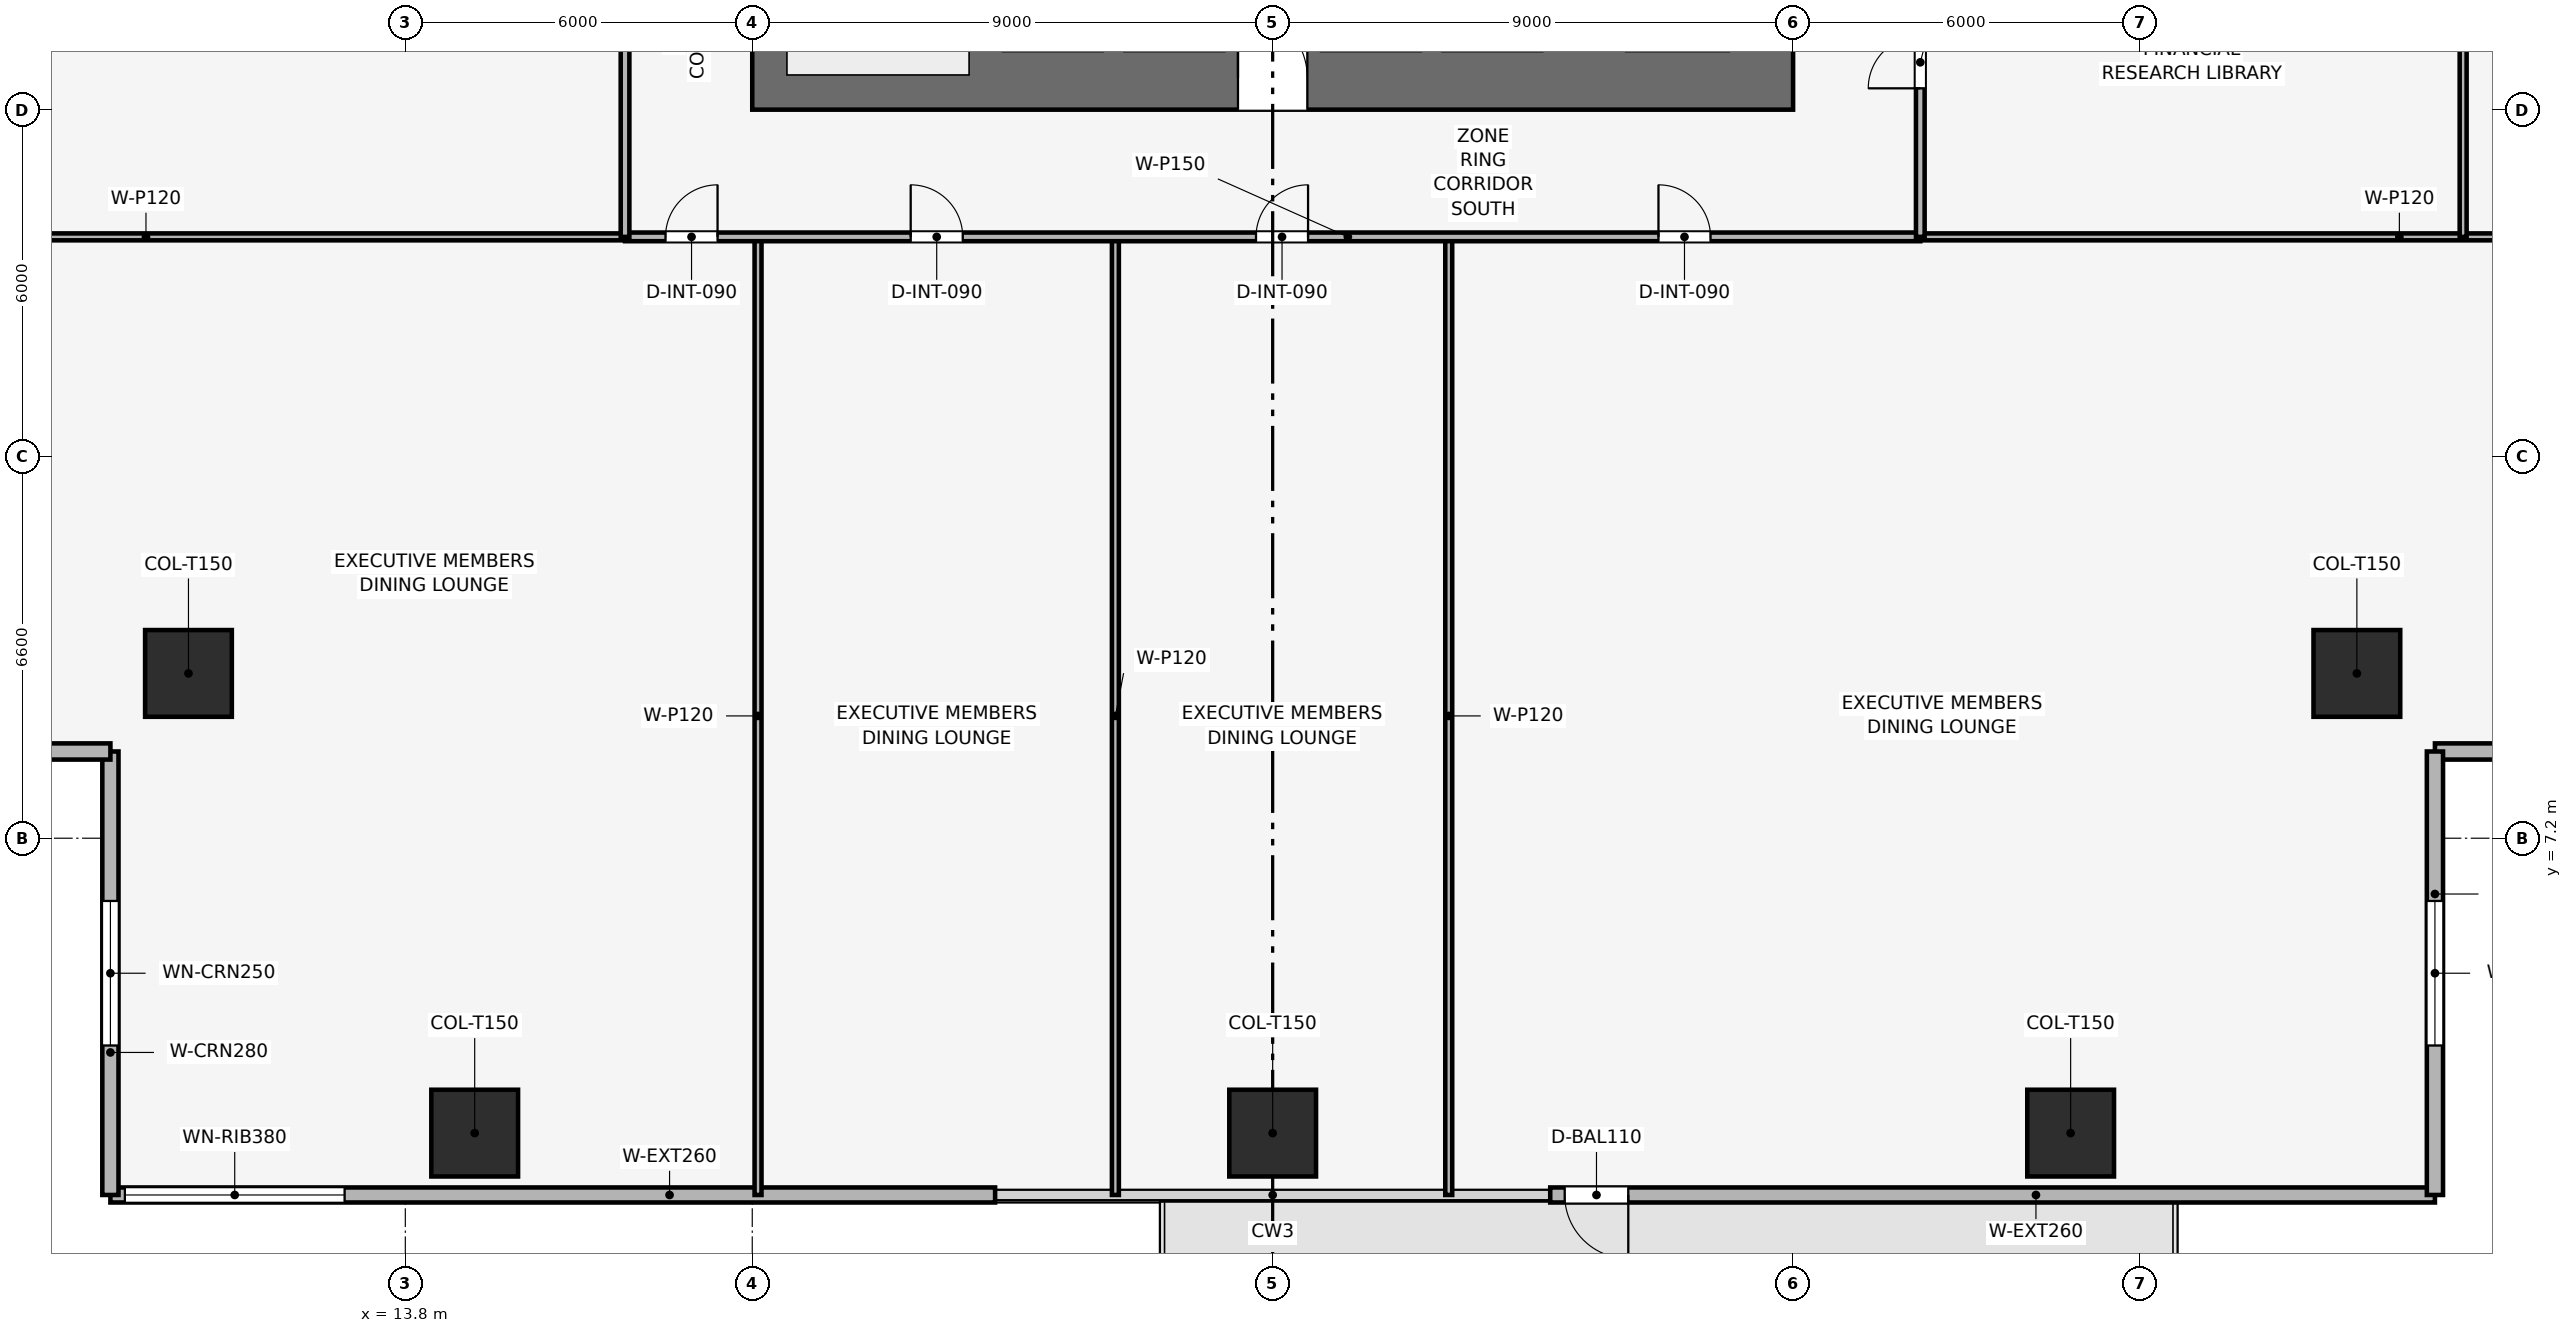
"""IFC4 building model, lengths in metres.
Left out: names, types, materials, properties, quantities, classifications, styles, units other than length and angle.
Written with IfcOpenShell. Run it as: python <this file> out.ifc"""

import sys

from ifc_helpers import new_model, si_unit, direction, frame, frame_2d, origin, origin_2d, place, context, subcontext, project, spatial, rectangle, extrude, element, fill, save


model = new_model("IFC4")
c1 = context("Model", 3, precision=1e-05, world=origin(), true_north=direction((0.0, 1.0)))
c2 = subcontext(c1, "Body", "Model", "MODEL_VIEW")
j1 = project(units=[si_unit("LENGTHUNIT", "METRE"), si_unit("PLANEANGLEUNIT", "RADIAN")], contexts=[c1])
p1 = place(None, origin())
s1 = spatial("IfcSite", under=j1, at=p1, CompositionType="ELEMENT")
p2 = place(p1, origin())
s2 = spatial("IfcBuilding", under=s1, at=p2, CompositionType="ELEMENT")
p3 = place(p2, frame((0.0, 0.0, 69.0)))
s3 = spatial("IfcBuildingStorey", under=s2, at=p3, CompositionType="ELEMENT", Elevation=69.0)
p4 = place(p3, frame((19.8, 20.35, 0.0), z_axis=(0.0, 0.0, 1.0), x_axis=(1.0, 0.0, 0.0)))
e1 = element("IfcWall", 1, at=p4, inside=s3, PredefinedType="SHEAR", context=c2, shape_type="SweptSolid", body=[
    extrude(rectangle(XDim=18.0, YDim=1.1, at=frame_2d((9.0, 0.0))), origin(), (0.0, 0.0, 1.0), 3.9),
])
p5 = place(p4, frame((8.4, 0.0, 0.0)))
e2 = element("IfcOpeningElement", 2, at=p5, cuts=e1, PredefinedType="OPENING", context=c2, shape_type="SweptSolid", body=[
    extrude(rectangle(XDim=1.2, YDim=2.2, at=frame_2d((0.6, 1.1))), frame((0.0, 0.56, 0.0), z_axis=(0.0, -1.0, 0.0), x_axis=(1.0, 0.0, 0.0)), (0.0, 0.0, 1.0), 1.12),
])
for number, where, z_axis, x_axis in (
    (3, (15.0, 2.1, 0.003), (0.0, 0.0, 1.0), (1.0, 0.0, 0.0)),
    (4, (28.8, 2.1, 0.003), (0.0, 0.0, 1.0), (1.0, 0.0, 0.0)),
    (5, (42.6, 2.1, 0.003), (0.0, 0.0, 1.0), (1.0, 0.0, 0.0)),
    (6, (10.05, 10.05, 0.003), (0.0, 0.0, 1.0), (1.0, 0.0, 0.0)),
    (7, (47.55, 10.05, 0.003), (0.0, 0.0, 1.0), (1.0, 0.0, 0.0)),
):
    element("IfcColumn", number, at=place(p3, frame(where, z_axis=z_axis, x_axis=x_axis)), inside=s3, PredefinedType="COLUMN", context=c2, shape_type="SweptSolid", body=[
        extrude(rectangle(XDim=1.5, YDim=1.5, at=origin_2d()), origin(), (0.0, 0.0, 1.0), 3.644),
    ])
p6 = place(p3, frame((48.9, 1.03, 0.0), z_axis=(0.0, 0.0, 1.0), x_axis=(-1.0, 0.0, 0.0)))
e8 = element("IfcWall", 8, at=p6, inside=s3, PredefinedType="SOLIDWALL", context=c2, shape_type="SweptSolid", body=[
    extrude(rectangle(XDim=15.3, YDim=0.26, at=frame_2d((7.65, 0.0))), origin(), (0.0, 0.0, 1.0), 3.65),
])
p7 = place(p6, frame((13.95, 0.0, 0.0)))
e9 = element("IfcOpeningElement", 9, at=p7, cuts=e8, PredefinedType="OPENING", context=c2, shape_type="SweptSolid", body=[
    extrude(rectangle(XDim=1.1, YDim=2.2, at=frame_2d((0.55, 1.1))), frame((0.0, 0.14, 0.0), z_axis=(0.0, -1.0, 0.0), x_axis=(1.0, 0.0, 0.0)), (0.0, 0.0, 1.0), 0.28),
])
p8 = place(p3, frame((24.0, 1.03, 0.0), z_axis=(0.0, 0.0, 1.0), x_axis=(-1.0, 0.0, 0.0)))
e10 = element("IfcWall", 10, at=p8, inside=s3, PredefinedType="SOLIDWALL", context=c2, shape_type="SweptSolid", body=[
    extrude(rectangle(XDim=15.3, YDim=0.26, at=frame_2d((7.65, 0.0))), origin(), (0.0, 0.0, 1.0), 3.65),
])
p9 = place(p8, frame((11.25, 0.0, 0.9)))
e11 = element("IfcOpeningElement", 11, at=p9, cuts=e10, PredefinedType="OPENING", context=c2, shape_type="SweptSolid", body=[
    extrude(rectangle(XDim=3.8, YDim=1.9, at=frame_2d((1.9, 0.95))), frame((0.0, 0.14, 0.0), z_axis=(0.0, -1.0, 0.0), x_axis=(1.0, 0.0, 0.0)), (0.0, 0.0, 1.0), 0.28),
])
p10 = place(p3, frame((8.7, 1.03, 0.0), z_axis=(0.0, 0.0, 1.0), x_axis=(0.0, 1.0, 0.0)))
e12 = element("IfcWall", 12, at=p10, inside=s3, PredefinedType="SOLIDWALL", context=c2, shape_type="SweptSolid", body=[
    extrude(rectangle(XDim=7.67, YDim=0.28, at=frame_2d((3.835, 0.0))), origin(), (0.0, 0.0, 1.0), 3.65),
])
p11 = place(p10, frame((2.585, 0.0, 0.9)))
e13 = element("IfcOpeningElement", 13, at=p11, cuts=e12, PredefinedType="OPENING", context=c2, shape_type="SweptSolid", body=[
    extrude(rectangle(XDim=2.5, YDim=1.9, at=frame_2d((1.25, 0.95))), frame((0.0, 0.15, 0.0), z_axis=(0.0, -1.0, 0.0), x_axis=(1.0, 0.0, 0.0)), (0.0, 0.0, 1.0), 0.3),
])
p12 = place(p3, frame((8.7, 8.7, 0.0), z_axis=(0.0, 0.0, 1.0), x_axis=(-1.0, 0.0, 0.0)))
e14 = element("IfcWall", 14, at=p12, inside=s3, PredefinedType="SOLIDWALL", context=c2, shape_type="SweptSolid", body=[
    extrude(rectangle(XDim=7.67, YDim=0.28, at=frame_2d((3.835, 0.0))), origin(), (0.0, 0.0, 1.0), 3.65),
])
p13 = place(p12, frame((2.585, 0.0, 0.9)))
e15 = element("IfcOpeningElement", 15, at=p13, cuts=e14, PredefinedType="OPENING", context=c2, shape_type="SweptSolid", body=[
    extrude(rectangle(XDim=2.5, YDim=1.9, at=frame_2d((1.25, 0.95))), frame((0.0, 0.15, 0.0), z_axis=(0.0, -1.0, 0.0), x_axis=(1.0, 0.0, 0.0)), (0.0, 0.0, 1.0), 0.3),
])
p14 = place(p3, frame((56.57, 8.7, 0.0), z_axis=(0.0, 0.0, 1.0), x_axis=(-1.0, 0.0, 0.0)))
e16 = element("IfcWall", 16, at=p14, inside=s3, PredefinedType="SOLIDWALL", context=c2, shape_type="SweptSolid", body=[
    extrude(rectangle(XDim=7.67, YDim=0.28, at=frame_2d((3.835, 0.0))), origin(), (0.0, 0.0, 1.0), 3.65),
])
p15 = place(p14, frame((2.585, 0.0, 0.9)))
e17 = element("IfcOpeningElement", 17, at=p15, cuts=e16, PredefinedType="OPENING", context=c2, shape_type="SweptSolid", body=[
    extrude(rectangle(XDim=2.5, YDim=1.9, at=frame_2d((1.25, 0.95))), frame((0.0, 0.15, 0.0), z_axis=(0.0, -1.0, 0.0), x_axis=(1.0, 0.0, 0.0)), (0.0, 0.0, 1.0), 0.3),
])
p16 = place(p3, frame((48.9, 8.7, 0.0), z_axis=(0.0, 0.0, 1.0), x_axis=(0.0, -1.0, 0.0)))
e18 = element("IfcWall", 18, at=p16, inside=s3, PredefinedType="SOLIDWALL", context=c2, shape_type="SweptSolid", body=[
    extrude(rectangle(XDim=7.67, YDim=0.28, at=frame_2d((3.835, 0.0))), origin(), (0.0, 0.0, 1.0), 3.65),
])
p17 = place(p16, frame((2.585, 0.0, 0.9)))
e19 = element("IfcOpeningElement", 19, at=p17, cuts=e18, PredefinedType="OPENING", context=c2, shape_type="SweptSolid", body=[
    extrude(rectangle(XDim=2.5, YDim=1.9, at=frame_2d((1.25, 0.95))), frame((0.0, 0.15, 0.0), z_axis=(0.0, -1.0, 0.0), x_axis=(1.0, 0.0, 0.0)), (0.0, 0.0, 1.0), 0.3),
])
for number, where, z_axis, x_axis in (
    (20, (19.9, 1.03, 0.0), (0.0, 0.0, 1.0), (0.0, 1.0, 0.0)),
    (21, (26.08, 1.03, 0.0), (0.0, 0.0, 1.0), (0.0, 1.0, 0.0)),
    (22, (31.845, 1.03, 0.0), (0.0, 0.0, 1.0), (0.0, 1.0, 0.0)),
    (23, (1.03, 17.6, 0.0), (0.0, 0.0, 1.0), (1.0, 0.0, 0.0)),
    (24, (40.0, 17.6, 0.0), (0.0, 0.0, 1.0), (1.0, 0.0, 0.0)),
):
    element("IfcWall", number, at=place(p3, frame(where, z_axis=z_axis, x_axis=x_axis)), inside=s3, PredefinedType="PARTITIONING", context=c2, shape_type="SweptSolid", body=[
        extrude(rectangle(XDim=16.57, YDim=0.12, at=frame_2d((8.285, 0.0))), origin(), (0.0, 0.0, 1.0), 2.935),
    ])
p18 = place(p3, frame((49.388, 17.6, 0.0), z_axis=(0.0, 0.0, 1.0), x_axis=(0.0, 1.0, 0.0)))
e25 = element("IfcWall", 25, at=p18, inside=s3, PredefinedType="PARTITIONING", context=c2, shape_type="SweptSolid", body=[
    extrude(rectangle(XDim=6.038, YDim=0.12, at=frame_2d((3.019, 0.0))), origin(), (0.0, 0.0, 1.0), 3.085),
])
p19 = place(p18, frame((3.753, 0.0, 0.0)))
e26 = element("IfcOpeningElement", 26, at=p19, cuts=e25, PredefinedType="OPENING", context=c2, shape_type="SweptSolid", body=[
    extrude(rectangle(XDim=0.9, YDim=2.1, at=frame_2d((0.45, 1.05))), frame((0.0, 0.07, 0.0), z_axis=(0.0, -1.0, 0.0), x_axis=(1.0, 0.0, 0.0)), (0.0, 0.0, 1.0), 0.14),
])
p20 = place(p3, frame((17.6, 17.6, 0.0), z_axis=(0.0, 0.0, 1.0), x_axis=(1.0, 0.0, 0.0)))
e27 = element("IfcWall", 27, at=p20, inside=s3, PredefinedType="PARTITIONING", context=c2, shape_type="SweptSolid", body=[
    extrude(rectangle(XDim=22.4, YDim=0.15, at=frame_2d((11.2, 0.0))), origin(), (0.0, 0.0, 1.0), 3.085),
])
p21 = place(p20, frame((0.7, 0.0, 0.0)))
e28 = element("IfcOpeningElement", 28, at=p21, cuts=e27, PredefinedType="OPENING", context=c2, shape_type="SweptSolid", body=[
    extrude(rectangle(XDim=0.9, YDim=2.1, at=frame_2d((0.45, 1.05))), frame((0.0, 0.085, 0.0), z_axis=(0.0, -1.0, 0.0), x_axis=(1.0, 0.0, 0.0)), (0.0, 0.0, 1.0), 0.17),
])
p22 = place(p20, frame((4.94, 0.0, 0.0)))
e29 = element("IfcOpeningElement", 29, at=p22, cuts=e27, PredefinedType="OPENING", context=c2, shape_type="SweptSolid", body=[
    extrude(rectangle(XDim=0.9, YDim=2.1, at=frame_2d((0.45, 1.05))), frame((0.0, 0.085, 0.0), z_axis=(0.0, -1.0, 0.0), x_axis=(1.0, 0.0, 0.0)), (0.0, 0.0, 1.0), 0.17),
])
p23 = place(p20, frame((10.912, 0.0, 0.0)))
e30 = element("IfcOpeningElement", 30, at=p23, cuts=e27, PredefinedType="OPENING", context=c2, shape_type="SweptSolid", body=[
    extrude(rectangle(XDim=0.9, YDim=2.1, at=frame_2d((0.45, 1.05))), frame((0.0, 0.085, 0.0), z_axis=(0.0, -1.0, 0.0), x_axis=(1.0, 0.0, 0.0)), (0.0, 0.0, 1.0), 0.17),
])
p24 = place(p20, frame((17.872, 0.0, 0.0)))
e31 = element("IfcOpeningElement", 31, at=p24, cuts=e27, PredefinedType="OPENING", context=c2, shape_type="SweptSolid", body=[
    extrude(rectangle(XDim=0.9, YDim=2.1, at=frame_2d((0.45, 1.05))), frame((0.0, 0.085, 0.0), z_axis=(0.0, -1.0, 0.0), x_axis=(1.0, 0.0, 0.0)), (0.0, 0.0, 1.0), 0.17),
])
p25 = place(p3, frame((17.6, 17.6, 0.0), z_axis=(0.0, 0.0, 1.0), x_axis=(0.0, 1.0, 0.0)))
e32 = element("IfcWall", 32, at=p25, inside=s3, PredefinedType="PARTITIONING", context=c2, shape_type="SweptSolid", body=[
    extrude(rectangle(XDim=22.4, YDim=0.15, at=frame_2d((11.2, 0.0))), origin(), (0.0, 0.0, 1.0), 3.085),
])
p26 = place(p25, frame((10.75, 0.0, 0.0)))
e33 = element("IfcOpeningElement", 33, at=p26, cuts=e32, PredefinedType="OPENING", context=c2, shape_type="SweptSolid", body=[
    extrude(rectangle(XDim=0.9, YDim=2.1, at=frame_2d((0.45, 1.05))), frame((0.0, 0.085, 0.0), z_axis=(0.0, -1.0, 0.0), x_axis=(1.0, 0.0, 0.0)), (0.0, 0.0, 1.0), 0.17),
])
p27 = place(p3, frame((40.0, 17.6, 0.0), z_axis=(0.0, 0.0, 1.0), x_axis=(0.0, 1.0, 0.0)))
e34 = element("IfcWall", 34, at=p27, inside=s3, PredefinedType="PARTITIONING", context=c2, shape_type="SweptSolid", body=[
    extrude(rectangle(XDim=22.4, YDim=0.15, at=frame_2d((11.2, 0.0))), origin(), (0.0, 0.0, 1.0), 3.085),
])
p28 = place(p27, frame((2.569, 0.0, 0.0)))
e35 = element("IfcOpeningElement", 35, at=p28, cuts=e34, PredefinedType="OPENING", context=c2, shape_type="SweptSolid", body=[
    extrude(rectangle(XDim=0.9, YDim=2.1, at=frame_2d((0.45, 1.05))), frame((0.0, 0.085, 0.0), z_axis=(0.0, -1.0, 0.0), x_axis=(1.0, 0.0, 0.0)), (0.0, 0.0, 1.0), 0.17),
])
p29 = place(p27, frame((13.769, 0.0, 0.0)))
e36 = element("IfcOpeningElement", 36, at=p29, cuts=e34, PredefinedType="OPENING", context=c2, shape_type="SweptSolid", body=[
    extrude(rectangle(XDim=0.9, YDim=2.1, at=frame_2d((0.45, 1.05))), frame((0.0, 0.085, 0.0), z_axis=(0.0, -1.0, 0.0), x_axis=(1.0, 0.0, 0.0)), (0.0, 0.0, 1.0), 0.17),
])
p30 = place(p7, origin())
e37 = element("IfcDoor", 37, at=p30, inside=s3, OperationType="SINGLE_SWING_LEFT", PredefinedType="DOOR", context=c2, shape_type="SweptSolid", body=[
    extrude(rectangle(XDim=1.1, YDim=2.2, at=frame_2d((0.55, 1.1))), frame((0.0, 0.025, 0.0), z_axis=(0.0, -1.0, 0.0), x_axis=(1.0, 0.0, 0.0)), (0.0, 0.0, 1.0), 0.05),
])
fill(e9, e37)
p31 = place(p9, origin())
e38 = element("IfcWindow", 38, at=p31, inside=s3, PartitioningType="SINGLE_PANEL", PredefinedType="WINDOW", context=c2, shape_type="SweptSolid", body=[
    extrude(rectangle(XDim=3.8, YDim=1.9, at=frame_2d((1.9, 0.95))), frame((0.0, 0.03, 0.0), z_axis=(0.0, -1.0, 0.0), x_axis=(1.0, 0.0, 0.0)), (0.0, 0.0, 1.0), 0.06),
])
fill(e11, e38)
p32 = place(p11, origin())
e39 = element("IfcWindow", 39, at=p32, inside=s3, PartitioningType="SINGLE_PANEL", PredefinedType="WINDOW", context=c2, shape_type="SweptSolid", body=[
    extrude(rectangle(XDim=2.5, YDim=1.9, at=frame_2d((1.25, 0.95))), frame((0.0, 0.03, 0.0), z_axis=(0.0, -1.0, 0.0), x_axis=(1.0, 0.0, 0.0)), (0.0, 0.0, 1.0), 0.06),
])
fill(e13, e39)
p33 = place(p17, origin())
e40 = element("IfcWindow", 40, at=p33, inside=s3, PartitioningType="SINGLE_PANEL", PredefinedType="WINDOW", context=c2, shape_type="SweptSolid", body=[
    extrude(rectangle(XDim=2.5, YDim=1.9, at=frame_2d((1.25, 0.95))), frame((0.0, 0.03, 0.0), z_axis=(0.0, -1.0, 0.0), x_axis=(1.0, 0.0, 0.0)), (0.0, 0.0, 1.0), 0.06),
])
fill(e19, e40)
p34 = place(p21, origin())
e41 = element("IfcDoor", 41, at=p34, inside=s3, OperationType="SINGLE_SWING_RIGHT", PredefinedType="DOOR", context=c2, shape_type="SweptSolid", body=[
    extrude(rectangle(XDim=0.9, YDim=2.1, at=frame_2d((0.45, 1.05))), frame((0.0, 0.025, 0.0), z_axis=(0.0, -1.0, 0.0), x_axis=(1.0, 0.0, 0.0)), (0.0, 0.0, 1.0), 0.05),
])
fill(e28, e41)
p35 = place(p22, origin())
e42 = element("IfcDoor", 42, at=p35, inside=s3, OperationType="SINGLE_SWING_LEFT", PredefinedType="DOOR", context=c2, shape_type="SweptSolid", body=[
    extrude(rectangle(XDim=0.9, YDim=2.1, at=frame_2d((0.45, 1.05))), frame((0.0, 0.025, 0.0), z_axis=(0.0, -1.0, 0.0), x_axis=(1.0, 0.0, 0.0)), (0.0, 0.0, 1.0), 0.05),
])
fill(e29, e42)
p36 = place(p23, origin())
e43 = element("IfcDoor", 43, at=p36, inside=s3, OperationType="SINGLE_SWING_RIGHT", PredefinedType="DOOR", context=c2, shape_type="SweptSolid", body=[
    extrude(rectangle(XDim=0.9, YDim=2.1, at=frame_2d((0.45, 1.05))), frame((0.0, 0.025, 0.0), z_axis=(0.0, -1.0, 0.0), x_axis=(1.0, 0.0, 0.0)), (0.0, 0.0, 1.0), 0.05),
])
fill(e30, e43)
p37 = place(p24, origin())
e44 = element("IfcDoor", 44, at=p37, inside=s3, OperationType="SINGLE_SWING_LEFT", PredefinedType="DOOR", context=c2, shape_type="SweptSolid", body=[
    extrude(rectangle(XDim=0.9, YDim=2.1, at=frame_2d((0.45, 1.05))), frame((0.0, 0.025, 0.0), z_axis=(0.0, -1.0, 0.0), x_axis=(1.0, 0.0, 0.0)), (0.0, 0.0, 1.0), 0.05),
])
fill(e31, e44)
p38 = place(p28, origin())
e45 = element("IfcDoor", 45, at=p38, inside=s3, OperationType="SINGLE_SWING_LEFT", PredefinedType="DOOR", context=c2, shape_type="SweptSolid", body=[
    extrude(rectangle(XDim=0.9, YDim=2.1, at=frame_2d((0.45, 1.05))), frame((0.0, 0.025, 0.0), z_axis=(0.0, -1.0, 0.0), x_axis=(1.0, 0.0, 0.0)), (0.0, 0.0, 1.0), 0.05),
])
fill(e35, e45)
p39 = place(p5, origin())
e46 = element("IfcDoor", 46, at=p39, inside=s3, OperationType="SINGLE_SWING_LEFT", PredefinedType="DOOR", context=c2, shape_type="SweptSolid", body=[
    extrude(rectangle(XDim=1.2, YDim=2.2, at=frame_2d((0.6, 1.1))), frame((0.0, 0.025, 0.0), z_axis=(0.0, -1.0, 0.0), x_axis=(1.0, 0.0, 0.0)), (0.0, 0.0, 1.0), 0.05),
])
fill(e2, e46)
save(model, sys.argv[1])
